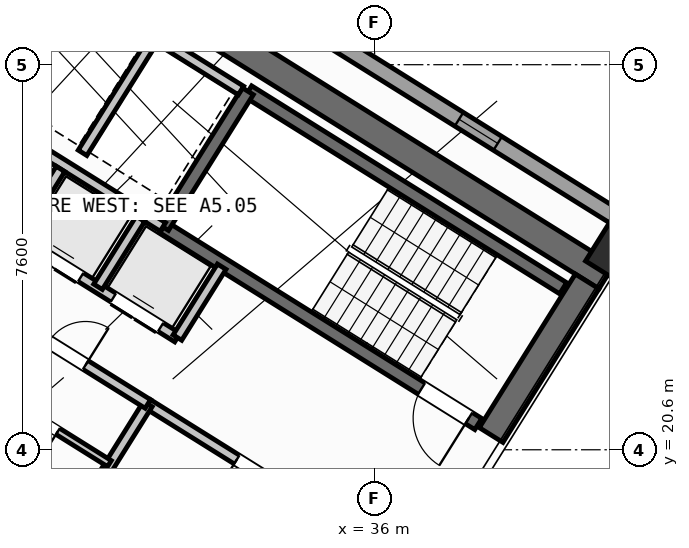
"""IFC4 building model, lengths in metres.
Left out: names, types, materials, properties, quantities, classifications, styles, units other than length and angle.
Written with IfcOpenShell. Run it as: python <this file> out.ifc"""

import sys

from ifc_helpers import new_model, si_unit, direction, frame, frame_2d, origin, origin_2d, place, context, subcontext, project, spatial, rectangle, hollow_rectangle, extrude, source, transform, mapped, element, fill, save


model = new_model("IFC4")
c1 = context("Model", 3, precision=1e-05, world=origin(), true_north=direction((0.0, 1.0)))
c2 = subcontext(c1, "Body", "Model", "MODEL_VIEW")
j1 = project(units=[si_unit("LENGTHUNIT", "METRE"), si_unit("PLANEANGLEUNIT", "RADIAN")], contexts=[c1])
p1 = place(None, origin())
s1 = spatial("IfcSite", under=j1, at=p1, CompositionType="ELEMENT")
p2 = place(p1, origin())
s2 = spatial("IfcBuilding", under=s1, at=p2, CompositionType="ELEMENT")
p3 = place(p2, frame((0.0, 0.0, 144.3)))
s3 = spatial("IfcBuildingStorey", under=s2, at=p3, CompositionType="ELEMENT", Elevation=144.3)
p4 = place(p3, frame((40.573, 24.01, 0.0), z_axis=(0.0, 0.0, 1.0), x_axis=(-0.848047359947, 0.529920442413, 0.0)))
e1 = element("IfcWall", 1, at=p4, inside=s3, PredefinedType="SHEAR", context=c2, shape_type="SweptSolid", body=[
    extrude(rectangle(XDim=13.14, YDim=0.55, at=frame_2d((6.57, 0.0))), origin(), (0.0, 0.0, 1.0), 3.35),
])
p5 = place(p3, frame((40.194, 23.922, 0.0), z_axis=(0.0, 0.0, 1.0), x_axis=(-0.529888438328, -0.848067357541, 0.0)))
e2 = element("IfcWall", 2, at=p5, inside=s3, PredefinedType="SHEAR", context=c2, shape_type="SweptSolid", body=[
    extrude(rectangle(XDim=3.575, YDim=0.55, at=frame_2d((1.788, 0.0))), origin(), (0.0, 0.0, 1.0), 3.35),
])
p6 = place(p3, frame((29.517, 30.594, 0.0), z_axis=(0.0, 0.0, 1.0), x_axis=(-0.529906864564, -0.848055844204, 0.0)))
e3 = element("IfcWall", 3, at=p6, inside=s3, PredefinedType="SHEAR", context=c2, shape_type="SweptSolid", body=[
    extrude(rectangle(XDim=3.575, YDim=0.55, at=frame_2d((1.788, 0.0))), origin(), (0.0, 0.0, 1.0), 3.35),
])
m1 = source(origin(), c2, "Body", "SweptSolid", [
    extrude(hollow_rectangle(XDim=0.9, YDim=0.9, WallThickness=0.036, at=origin_2d()), origin(), (0.0, 0.0, 1.0), 3.6),
])
p7 = place(p3, frame((40.783, 24.469, 0.0), z_axis=(0.0, 0.0, 1.0), x_axis=(-0.848048096156, 0.529919264233, 0.0)))
e4 = element("IfcColumn", 4, at=p7, inside=s3, PredefinedType="COLUMN", context=c2, shape_type="MappedRepresentation", body=[
    mapped(m1, transform((0.0, 0.0, 0.0), scale=1.0)),
])
p8 = place(p3, frame((14.138, 41.825, 0.0), z_axis=(0.0, 0.0, 1.0), x_axis=(0.848046498049, -0.529921821731, 0.0)))
e5 = element("IfcWall", 5, at=p8, inside=s3, PredefinedType="STANDARD", context=c2, shape_type="SweptSolid", body=[
    extrude(rectangle(XDim=31.588, YDim=0.32, at=frame_2d((15.794, 0.0))), origin(), (0.0, 0.0, 1.0), 3.35),
])
p9 = place(p8, frame((2.949, 0.0, 0.0)))
e6 = element("IfcOpeningElement", 6, at=p9, cuts=e5, PredefinedType="OPENING", context=c2, shape_type="SweptSolid", body=[
    extrude(rectangle(XDim=1.05, YDim=2.15, at=frame_2d((0.525, 1.075))), frame((0.0, 0.17, 0.0), z_axis=(0.0, -1.0, 0.0), x_axis=(1.0, 0.0, 0.0)), (0.0, 0.0, 1.0), 0.34),
])
p10 = place(p8, frame((0.861, 0.0, 0.85)))
e7 = element("IfcOpeningElement", 7, at=p10, cuts=e5, PredefinedType="OPENING", context=c2, shape_type="SweptSolid", body=[
    extrude(rectangle(XDim=1.5, YDim=1.5, at=frame_2d((0.75, 0.75))), frame((0.0, 0.17, 0.0), z_axis=(0.0, -1.0, 0.0), x_axis=(1.0, 0.0, 0.0)), (0.0, 0.0, 1.0), 0.34),
])
p11 = place(p8, frame((8.494, 0.0, 0.85)))
e8 = element("IfcOpeningElement", 8, at=p11, cuts=e5, PredefinedType="OPENING", context=c2, shape_type="SweptSolid", body=[
    extrude(rectangle(XDim=1.8, YDim=1.5, at=frame_2d((0.9, 0.75))), frame((0.0, 0.17, 0.0), z_axis=(0.0, -1.0, 0.0), x_axis=(1.0, 0.0, 0.0)), (0.0, 0.0, 1.0), 0.34),
])
p12 = place(p8, frame((13.874, 0.0, 0.85)))
e9 = element("IfcOpeningElement", 9, at=p12, cuts=e5, PredefinedType="OPENING", context=c2, shape_type="SweptSolid", body=[
    extrude(rectangle(XDim=1.5, YDim=1.5, at=frame_2d((0.75, 0.75))), frame((0.0, 0.17, 0.0), z_axis=(0.0, -1.0, 0.0), x_axis=(1.0, 0.0, 0.0)), (0.0, 0.0, 1.0), 0.34),
])
p13 = place(p8, frame((17.104, 0.0, 1.0)))
e10 = element("IfcOpeningElement", 10, at=p13, cuts=e5, PredefinedType="OPENING", context=c2, shape_type="SweptSolid", body=[
    extrude(rectangle(XDim=0.9, YDim=1.25, at=frame_2d((0.45, 0.625))), frame((0.0, 0.17, 0.0), z_axis=(0.0, -1.0, 0.0), x_axis=(1.0, 0.0, 0.0)), (0.0, 0.0, 1.0), 0.34),
])
p14 = place(p8, frame((22.144, 0.0, 1.0)))
e11 = element("IfcOpeningElement", 11, at=p14, cuts=e5, PredefinedType="OPENING", context=c2, shape_type="SweptSolid", body=[
    extrude(rectangle(XDim=0.9, YDim=1.25, at=frame_2d((0.45, 0.625))), frame((0.0, 0.17, 0.0), z_axis=(0.0, -1.0, 0.0), x_axis=(1.0, 0.0, 0.0)), (0.0, 0.0, 1.0), 0.34),
])
p15 = place(p8, frame((27.744, 0.0, 1.0)))
e12 = element("IfcOpeningElement", 12, at=p15, cuts=e5, PredefinedType="OPENING", context=c2, shape_type="SweptSolid", body=[
    extrude(rectangle(XDim=0.9, YDim=1.25, at=frame_2d((0.45, 0.625))), frame((0.0, 0.17, 0.0), z_axis=(0.0, -1.0, 0.0), x_axis=(1.0, 0.0, 0.0)), (0.0, 0.0, 1.0), 0.34),
])
p16 = place(p3, frame((31.28, 18.261, 0.0), z_axis=(0.0, 0.0, 1.0), x_axis=(-0.848051618787, 0.529913626805, 0.0)))
e13 = element("IfcWall", 13, at=p16, inside=s3, PredefinedType="SHEAR", context=c2, shape_type="SweptSolid", body=[
    extrude(rectangle(XDim=7.46, YDim=0.26, at=frame_2d((3.73, 0.0))), origin(), (0.0, 0.0, 1.0), 3.35),
])
p17 = place(p16, frame((0.36, 0.0, 0.0)))
e14 = element("IfcOpeningElement", 14, at=p17, cuts=e13, PredefinedType="OPENING", context=c2, shape_type="SweptSolid", body=[
    extrude(rectangle(XDim=0.86, YDim=2.05, at=frame_2d((0.43, 1.025))), frame((0.0, 0.14, 0.0), z_axis=(0.0, -1.0, 0.0), x_axis=(1.0, 0.0, 0.0)), (0.0, 0.0, 1.0), 0.28),
])
p18 = place(p3, frame((39.721, 23.788, 0.0), z_axis=(0.0, 0.0, 1.0), x_axis=(-0.848054434086, 0.529909121291, 0.0)))
e15 = element("IfcWall", 15, at=p18, inside=s3, PredefinedType="SHEAR", context=c2, shape_type="SweptSolid", body=[
    extrude(rectangle(XDim=7.33, YDim=0.26, at=frame_2d((3.665, 0.0))), origin(), (0.0, 0.0, 1.0), 3.35),
])
p19 = place(p3, frame((38.046, 21.108, 0.0), z_axis=(0.0, 0.0, 1.0), x_axis=(-0.848054434086, 0.529909121291, 0.0)))
e16 = element("IfcWall", 16, at=p19, inside=s3, PredefinedType="SHEAR", context=c2, shape_type="SweptSolid", body=[
    extrude(rectangle(XDim=7.33, YDim=0.26, at=frame_2d((3.665, 0.0))), origin(), (0.0, 0.0, 1.0), 3.35),
])
p20 = place(p19, frame((0.22, 0.0, 0.0)))
e17 = element("IfcOpeningElement", 17, at=p20, cuts=e16, PredefinedType="OPENING", context=c2, shape_type="SweptSolid", body=[
    extrude(rectangle(XDim=1.1, YDim=2.1, at=frame_2d((0.55, 1.05))), frame((0.0, 0.14, 0.0), z_axis=(0.0, -1.0, 0.0), x_axis=(1.0, 0.0, 0.0)), (0.0, 0.0, 1.0), 0.28),
])
p21 = place(p3, frame((33.496, 27.677, 0.0), z_axis=(0.0, 0.0, 1.0), x_axis=(-0.529908658664, -0.84805472316, 0.0)))
e18 = element("IfcWall", 18, at=p21, inside=s3, PredefinedType="SHEAR", context=c2, shape_type="SweptSolid", body=[
    extrude(rectangle(XDim=3.16, YDim=0.26, at=frame_2d((1.58, 0.0))), origin(), (0.0, 0.0, 1.0), 3.35),
])
p22 = place(p3, frame((36.417, 18.447, 0.0), z_axis=(0.0, 0.0, 1.0), x_axis=(-0.848064879198, 0.529892404805, 0.0)))
e19 = element("IfcWall", 19, at=p22, inside=s3, PredefinedType="STANDARD", context=c2, shape_type="SweptSolid", body=[
    extrude(rectangle(XDim=5.768, YDim=0.2, at=frame_2d((2.884, 0.0))), origin(), (0.0, 0.0, 1.0), 3.34),
])
p23 = place(p22, frame((2.548, 0.0, 0.0)))
e20 = element("IfcOpeningElement", 20, at=p23, cuts=e19, PredefinedType="OPENING", context=c2, shape_type="SweptSolid", body=[
    extrude(rectangle(XDim=1.15, YDim=2.1, at=frame_2d((0.575, 1.05))), frame((0.0, 0.11, 0.0), z_axis=(0.0, -1.0, 0.0), x_axis=(1.0, 0.0, 0.0)), (0.0, 0.0, 1.0), 0.22),
])
p24 = place(p3, frame((31.822, 24.998, 0.0), z_axis=(0.0, 0.0, 1.0), x_axis=(-0.848036912365, 0.52993716162, 0.0)))
e21 = element("IfcWall", 21, at=p24, inside=s3, PredefinedType="STANDARD", context=c2, shape_type="SweptSolid", body=[
    extrude(rectangle(XDim=4.618, YDim=0.2, at=frame_2d((2.309, 0.0))), origin(), (0.0, 0.0, 1.0), 3.34),
])
p25 = place(p3, frame((32.108, 22.814, 0.0), z_axis=(0.0, 0.0, 1.0), x_axis=(-0.848042229521, 0.529928652696, 0.0)))
e22 = element("IfcWall", 22, at=p25, inside=s3, PredefinedType="STANDARD", context=c2, shape_type="SweptSolid", body=[
    extrude(rectangle(XDim=5.62, YDim=0.2, at=frame_2d((2.81, 0.0))), origin(), (0.0, 0.0, 1.0), 3.34),
])
p26 = place(p25, frame((0.39, 0.0, 0.0)))
e23 = element("IfcOpeningElement", 23, at=p26, cuts=e22, PredefinedType="OPENING", context=c2, shape_type="SweptSolid", body=[
    extrude(rectangle(XDim=1.1, YDim=2.15, at=frame_2d((0.55, 1.075))), frame((0.0, 0.11, 0.0), z_axis=(0.0, -1.0, 0.0), x_axis=(1.0, 0.0, 0.0)), (0.0, 0.0, 1.0), 0.22),
])
p27 = place(p25, frame((2.25, 0.0, 0.0)))
e24 = element("IfcOpeningElement", 24, at=p27, cuts=e22, PredefinedType="OPENING", context=c2, shape_type="SweptSolid", body=[
    extrude(rectangle(XDim=1.1, YDim=2.15, at=frame_2d((0.55, 1.075))), frame((0.0, 0.11, 0.0), z_axis=(0.0, -1.0, 0.0), x_axis=(1.0, 0.0, 0.0)), (0.0, 0.0, 1.0), 0.22),
])
p28 = place(p25, frame((4.11, 0.0, 0.0)))
e25 = element("IfcOpeningElement", 25, at=p28, cuts=e22, PredefinedType="OPENING", context=c2, shape_type="SweptSolid", body=[
    extrude(rectangle(XDim=1.1, YDim=2.15, at=frame_2d((0.55, 1.075))), frame((0.0, 0.11, 0.0), z_axis=(0.0, -1.0, 0.0), x_axis=(1.0, 0.0, 0.0)), (0.0, 0.0, 1.0), 0.22),
])
p29 = place(p3, frame((32.982, 24.213, 0.0), z_axis=(0.0, 0.0, 1.0), x_axis=(-0.529839334948, -0.84809803628, 0.0)))
e26 = element("IfcWall", 26, at=p29, inside=s3, PredefinedType="STANDARD", context=c2, shape_type="SweptSolid", body=[
    extrude(rectangle(XDim=1.65, YDim=0.2, at=frame_2d((0.825, 0.0))), origin(), (0.0, 0.0, 1.0), 3.34),
])
p30 = place(p3, frame((31.645, 28.716, 0.0), z_axis=(0.0, 0.0, 1.0), x_axis=(-0.52986693015, -0.848080795876, 0.0)))
e27 = element("IfcWall", 27, at=p30, inside=s3, PredefinedType="STANDARD", context=c2, shape_type="SweptSolid", body=[
    extrude(rectangle(XDim=2.66, YDim=0.2, at=frame_2d((1.33, 0.0))), origin(), (0.0, 0.0, 1.0), 3.34),
])
p31 = place(p3, frame((33.363, 27.69, 0.0), z_axis=(0.0, 0.0, 1.0), x_axis=(-0.848047090064, 0.529920874315, 0.0)))
e28 = element("IfcWall", 28, at=p31, inside=s3, PredefinedType="STANDARD", context=c2, shape_type="SweptSolid", body=[
    extrude(rectangle(XDim=4.498, YDim=0.2, at=frame_2d((2.249, 0.0))), origin(), (0.0, 0.0, 1.0), 3.34),
])
for number, where, z_axis, x_axis in (
    (29, (31.379, 25.156, 0.0), (0.0, 0.0, 1.0), (-0.53, -0.848, 0.0)),
    (30, (29.801, 26.142, 0.0), (0.0, 0.0, 1.0), (-0.53, -0.848, 0.0)),
):
    element("IfcWall", number, at=place(p3, frame(where, z_axis=z_axis, x_axis=x_axis)), inside=s3, PredefinedType="STANDARD", context=c2, shape_type="SweptSolid", body=[
        extrude(rectangle(XDim=1.58, YDim=0.2, at=frame_2d((0.79, 0.0))), origin(), (0.0, 0.0, 1.0), 3.34),
    ])
p32 = place(p3, frame((31.525, 21.504, 0.0), z_axis=(0.0, 0.0, 1.0), x_axis=(-0.529907497854, -0.848055448493, 0.0)))
e31 = element("IfcWall", 31, at=p32, inside=s3, PredefinedType="STANDARD", context=c2, shape_type="SweptSolid", body=[
    extrude(rectangle(XDim=2.88, YDim=0.2, at=frame_2d((1.44, 0.0))), origin(), (0.0, 0.0, 1.0), 3.34),
])
p33 = place(p3, frame((31.525, 21.504, 0.0), z_axis=(0.0, 0.0, 1.0), x_axis=(-0.848040211232, 0.529931882541, 0.0)))
e32 = element("IfcWall", 32, at=p33, inside=s3, PredefinedType="STANDARD", context=c2, shape_type="SweptSolid", body=[
    extrude(rectangle(XDim=6.218, YDim=0.2, at=frame_2d((3.109, 0.0))), origin(), (0.0, 0.0, 1.0), 3.34),
])
p34 = place(p33, frame((4.4, 0.0, 0.0)))
e33 = element("IfcOpeningElement", 33, at=p34, cuts=e32, PredefinedType="OPENING", context=c2, shape_type="SweptSolid", body=[
    extrude(rectangle(XDim=0.86, YDim=2.05, at=frame_2d((0.43, 1.025))), frame((0.0, 0.11, 0.0), z_axis=(0.0, -1.0, 0.0), x_axis=(1.0, 0.0, 0.0)), (0.0, 0.0, 1.0), 0.22),
])
p35 = place(p33, frame((1.45, 0.0, 0.0)))
e34 = element("IfcOpeningElement", 34, at=p35, cuts=e32, PredefinedType="OPENING", context=c2, shape_type="SweptSolid", body=[
    extrude(rectangle(XDim=0.86, YDim=2.05, at=frame_2d((0.43, 1.025))), frame((0.0, 0.11, 0.0), z_axis=(0.0, -1.0, 0.0), x_axis=(1.0, 0.0, 0.0)), (0.0, 0.0, 1.0), 0.22),
])
p36 = place(p3, frame((30.766, 20.327, 0.0), z_axis=(0.0, 0.0, 1.0), x_axis=(-0.848052663127, 0.529911955482, 0.0)))
e35 = element("IfcWall", 35, at=p36, inside=s3, PredefinedType="PLUMBINGWALL", context=c2, shape_type="SweptSolid", body=[
    extrude(rectangle(XDim=3.28, YDim=0.14, at=frame_2d((1.64, 0.0))), origin(), (0.0, 0.0, 1.0), 3.34),
])
p37 = place(p36, frame((1.2, 0.0, 0.0)))
e36 = element("IfcOpeningElement", 36, at=p37, cuts=e35, PredefinedType="OPENING", context=c2, shape_type="SweptSolid", body=[
    extrude(rectangle(XDim=0.78, YDim=2.05, at=frame_2d((0.39, 1.025))), frame((0.0, 0.08, 0.0), z_axis=(0.0, -1.0, 0.0), x_axis=(1.0, 0.0, 0.0)), (0.0, 0.0, 1.0), 0.16),
])
m2 = source(origin(), c2, "Body", "SweptSolid", [
    extrude(rectangle(XDim=0.9, YDim=1.25, at=frame_2d((0.45, 0.625))), frame((0.0, 0.03, 0.0), z_axis=(0.0, -1.0, 0.0), x_axis=(1.0, 0.0, 0.0)), (0.0, 0.0, 1.0), 0.06),
])
p38 = place(p15, origin())
e37 = element("IfcWindow", 37, at=p38, inside=s3, PartitioningType="SINGLE_PANEL", PredefinedType="WINDOW", context=c2, shape_type="MappedRepresentation", body=[
    mapped(m2, transform((0.0, 0.0, 0.0), scale=1.0)),
])
fill(e12, e37)
m3 = source(origin(), c2, "Body", "SweptSolid", [
    extrude(rectangle(XDim=1.1, YDim=2.1, at=frame_2d((0.55, 1.05))), frame((0.0, 0.025, 0.0), z_axis=(0.0, -1.0, 0.0), x_axis=(1.0, 0.0, 0.0)), (0.0, 0.0, 1.0), 0.05),
])
p39 = place(p20, origin())
e38 = element("IfcDoor", 38, at=p39, inside=s3, OperationType="SINGLE_SWING_LEFT", PredefinedType="DOOR", context=c2, shape_type="MappedRepresentation", body=[
    mapped(m3, transform((0.0, 0.0, 0.0), scale=1.0)),
])
fill(e17, e38)
m4 = source(origin(), c2, "Body", "SweptSolid", [
    extrude(rectangle(XDim=1.15, YDim=2.1, at=frame_2d((0.575, 1.05))), frame((0.0, 0.025, 0.0), z_axis=(0.0, -1.0, 0.0), x_axis=(1.0, 0.0, 0.0)), (0.0, 0.0, 1.0), 0.05),
])
p40 = place(p23, origin())
e39 = element("IfcDoor", 39, at=p40, inside=s3, OperationType="SINGLE_SWING_RIGHT", PredefinedType="DOOR", context=c2, shape_type="MappedRepresentation", body=[
    mapped(m4, transform((0.0, 0.0, 0.0), scale=1.0)),
])
fill(e20, e39)
m5 = source(origin(), c2, "Body", "SweptSolid", [
    extrude(rectangle(XDim=1.1, YDim=2.15, at=frame_2d((0.55, 1.075))), frame((0.0, 0.025, 0.0), z_axis=(0.0, -1.0, 0.0), x_axis=(1.0, 0.0, 0.0)), (0.0, 0.0, 1.0), 0.05),
])
p41 = place(p26, origin())
e40 = element("IfcDoor", 40, at=p41, inside=s3, OperationType="DOUBLE_DOOR_SLIDING", PredefinedType="DOOR", context=c2, shape_type="MappedRepresentation", body=[
    mapped(m5, transform((0.0, 0.0, 0.0), scale=1.0)),
])
fill(e23, e40)
p42 = place(p27, origin())
e41 = element("IfcDoor", 41, at=p42, inside=s3, OperationType="DOUBLE_DOOR_SLIDING", PredefinedType="DOOR", context=c2, shape_type="MappedRepresentation", body=[
    mapped(m5, transform((0.0, 0.0, 0.0), scale=1.0)),
])
fill(e24, e41)
m6 = source(origin(), c2, "Body", "SweptSolid", [
    extrude(rectangle(XDim=0.86, YDim=2.05, at=frame_2d((0.43, 1.025))), frame((0.0, 0.025, 0.0), z_axis=(0.0, -1.0, 0.0), x_axis=(1.0, 0.0, 0.0)), (0.0, 0.0, 1.0), 0.05),
])
p43 = place(p35, frame((0.86, 0.0, 0.0), z_axis=(0.0, 0.0, 1.0), x_axis=(-1.0, 0.0, 0.0)))
e42 = element("IfcDoor", 42, at=p43, inside=s3, OperationType="SINGLE_SWING_RIGHT", PredefinedType="DOOR", context=c2, shape_type="MappedRepresentation", body=[
    mapped(m6, transform((0.0, 0.0, 0.0), scale=1.0)),
])
fill(e34, e42)
m7 = source(origin(), c2, "Body", "SweptSolid", [
    extrude(rectangle(XDim=0.78, YDim=2.05, at=frame_2d((0.39, 1.025))), frame((0.0, 0.025, 0.0), z_axis=(0.0, -1.0, 0.0), x_axis=(1.0, 0.0, 0.0)), (0.0, 0.0, 1.0), 0.05),
])
p44 = place(p37, origin())
e43 = element("IfcDoor", 43, at=p44, inside=s3, OperationType="SINGLE_SWING_LEFT", PredefinedType="DOOR", context=c2, shape_type="MappedRepresentation", body=[
    mapped(m7, transform((0.0, 0.0, 0.0), scale=1.0)),
])
fill(e36, e43)
save(model, sys.argv[1])
